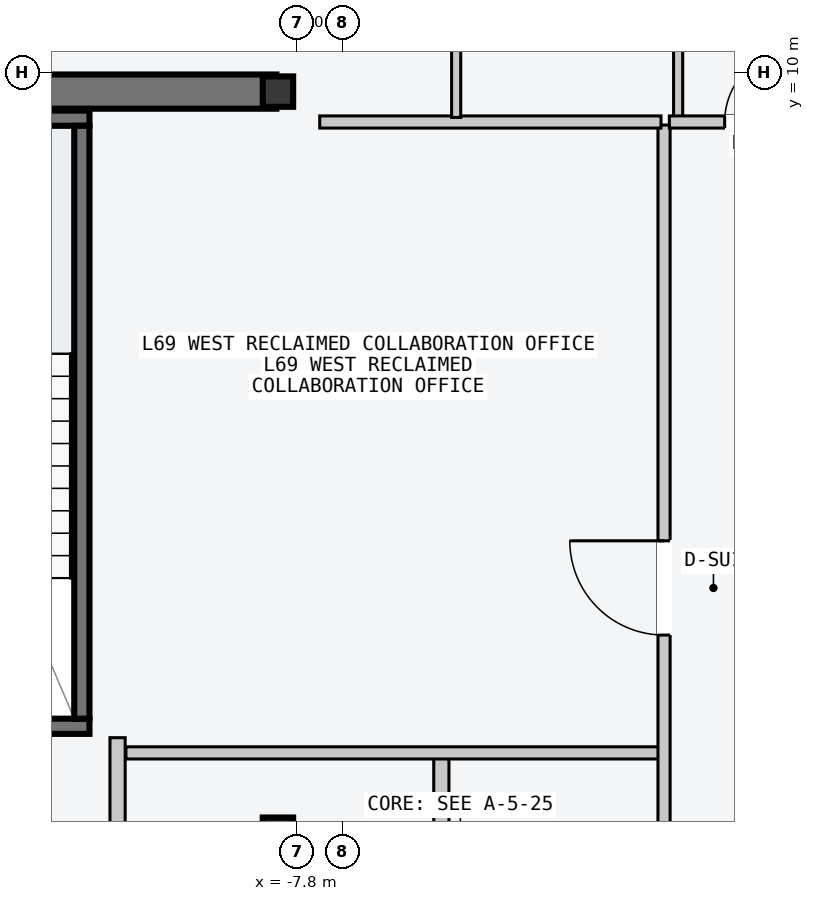
"""IFC4 building model, lengths in metres.
Left out: names, types, materials, properties, quantities, classifications, styles, units other than length and angle.
Written with IfcOpenShell. Run it as: python <this file> out.ifc"""

import sys

from ifc_helpers import new_model, si_unit, direction, frame, frame_2d, origin, origin_2d, place, context, subcontext, project, spatial, rectangle, i_section, extrude, element, fill, save


model = new_model("IFC4")
c1 = context("Model", 3, precision=1e-05, world=origin(), true_north=direction((0.0, 1.0)))
c2 = subcontext(c1, "Body", "Model", "MODEL_VIEW")
j1 = project(units=[si_unit("LENGTHUNIT", "METRE"), si_unit("PLANEANGLEUNIT", "RADIAN")], contexts=[c1])
p1 = place(None, origin())
s1 = spatial("IfcSite", under=j1, at=p1, CompositionType="ELEMENT")
p2 = place(p1, origin())
s2 = spatial("IfcBuilding", under=s1, at=p2, CompositionType="ELEMENT")
p3 = place(p2, frame((0.0, 0.0, 261.6)))
s3 = spatial("IfcBuildingStorey", under=s2, at=p3, CompositionType="ELEMENT", Elevation=261.6)
p4 = place(p3, frame((-14.53, 9.75, -0.2), z_axis=(0.0, 0.0, 1.0), x_axis=(1.0, 0.0, 0.0)))
e1 = element("IfcWall", 1, at=p4, inside=s3, PredefinedType="SHEAR", context=c2, shape_type="SweptSolid", body=[
    extrude(rectangle(XDim=6.46, YDim=0.45, at=frame_2d((3.23, 0.0))), origin(), (0.0, 0.0, 1.0), 3.6),
])
p5 = place(p3, frame((-14.25, 1.4, -0.2), z_axis=(0.0, 0.0, 1.0), x_axis=(1.0, 0.0, 0.0)))
e2 = element("IfcWall", 2, at=p5, inside=s3, PredefinedType="SOLIDWALL", context=c2, shape_type="SweptSolid", body=[
    extrude(rectangle(XDim=3.72, YDim=0.2, at=frame_2d((1.86, 0.0))), origin(), (0.0, 0.0, 1.0), 3.6),
])
p6 = place(p5, frame((1.5, 0.0, 0.2)))
e3 = element("IfcOpeningElement", 3, at=p6, cuts=e2, PredefinedType="OPENING", context=c2, shape_type="SweptSolid", body=[
    extrude(rectangle(XDim=1.12, YDim=2.18, at=frame_2d((0.56, 1.09))), frame((0.0, 0.11, 0.0), z_axis=(0.0, -1.0, 0.0), x_axis=(1.0, 0.0, 0.0)), (0.0, 0.0, 1.0), 0.22),
])
p7 = place(p3, frame((-14.25, 9.4, -0.2), z_axis=(0.0, 0.0, 1.0), x_axis=(1.0, 0.0, 0.0)))
e4 = element("IfcWall", 4, at=p7, inside=s3, PredefinedType="SOLIDWALL", context=c2, shape_type="SweptSolid", body=[
    extrude(rectangle(XDim=3.72, YDim=0.2, at=frame_2d((1.86, 0.0))), origin(), (0.0, 0.0, 1.0), 3.6),
])
p8 = place(p3, frame((-10.63, 1.5, -0.2), z_axis=(0.0, 0.0, 1.0), x_axis=(0.0, 1.0, 0.0)))
e5 = element("IfcWall", 5, at=p8, inside=s3, PredefinedType="SOLIDWALL", context=c2, shape_type="SweptSolid", body=[
    extrude(rectangle(XDim=7.8, YDim=0.2, at=frame_2d((3.9, 0.0))), origin(), (0.0, 0.0, 1.0), 3.6),
])
for number, where, z_axis, x_axis in (
    (6, (-8.05, 0.0, 0.0), (0.0, 0.0, 1.0), (1.0, 0.0, 0.0)),
    (7, (-8.05, 9.75, 0.0), (0.0, 0.0, 1.0), (1.0, 0.0, 0.0)),
):
    element("IfcColumn", number, at=place(p3, frame(where, z_axis=z_axis, x_axis=x_axis)), inside=s3, PredefinedType="COLUMN", context=c2, shape_type="SweptSolid", body=[
        extrude(i_section(OverallWidth=0.4, OverallDepth=0.4, WebThickness=0.013, FlangeThickness=0.021, at=origin_2d()), origin(), (0.0, 0.0, 1.0), 3.6),
    ])
p9 = place(p3, frame((-5.9, -9.45, 0.0), z_axis=(0.0, 0.0, 1.0), x_axis=(0.0, 1.0, 0.0)))
e8 = element("IfcWall", 8, at=p9, inside=s3, PredefinedType="PARTITIONING", context=c2, shape_type="SweptSolid", body=[
    extrude(rectangle(XDim=10.5, YDim=0.2, at=frame_2d((5.25, 0.0))), origin(), (0.0, 0.0, 1.0), 3.4),
])
p10 = place(p9, frame((3.9, 0.0, 0.0)))
e9 = element("IfcOpeningElement", 9, at=p10, cuts=e8, PredefinedType="OPENING", context=c2, shape_type="SweptSolid", body=[
    extrude(rectangle(XDim=1.5, YDim=2.2, at=frame_2d((0.75, 1.1))), frame((0.0, 0.11, 0.0), z_axis=(0.0, -1.0, 0.0), x_axis=(1.0, 0.0, 0.0)), (0.0, 0.0, 1.0), 0.22),
])
p11 = place(p3, frame((-10.16, -2.55, 0.0), z_axis=(0.0, 0.0, 1.0), x_axis=(0.0, 1.0, 0.0)))
e10 = element("IfcWall", 10, at=p11, inside=s3, PredefinedType="PARTITIONING", context=c2, shape_type="SweptSolid", body=[
    extrude(rectangle(XDim=3.8, YDim=0.2, at=frame_2d((1.9, 0.0))), origin(), (0.0, 0.0, 1.0), 3.4),
])
p12 = place(p11, frame((1.3, 0.0, 0.0)))
e11 = element("IfcOpeningElement", 11, at=p12, cuts=e10, PredefinedType="OPENING", context=c2, shape_type="SweptSolid", body=[
    extrude(rectangle(XDim=1.1, YDim=2.15, at=frame_2d((0.55, 1.075))), frame((0.0, 0.11, 0.0), z_axis=(0.0, -1.0, 0.0), x_axis=(1.0, 0.0, 0.0)), (0.0, 0.0, 1.0), 0.22),
])
p13 = place(p3, frame((-10.05, 1.05, 0.0), z_axis=(0.0, 0.0, 1.0), x_axis=(1.0, 0.0, 0.0)))
e12 = element("IfcWall", 12, at=p13, inside=s3, PredefinedType="PARTITIONING", context=c2, shape_type="SweptSolid", body=[
    extrude(rectangle(XDim=7.04, YDim=0.16, at=frame_2d((3.52, 0.0))), origin(), (0.0, 0.0, 1.0), 3.4),
])
p14 = place(p3, frame((-2.97, -3.5, 0.0), z_axis=(0.0, 0.0, 1.0), x_axis=(0.0, 1.0, 0.0)))
e13 = element("IfcWall", 13, at=p14, inside=s3, PredefinedType="PARTITIONING", context=c2, shape_type="SweptSolid", body=[
    extrude(rectangle(XDim=12.81, YDim=0.16, at=frame_2d((6.405, 0.0))), origin(), (0.0, 0.0, 1.0), 3.4),
])
p15 = place(p14, frame((6.1, 0.0, 0.0)))
e14 = element("IfcOpeningElement", 14, at=p15, cuts=e13, PredefinedType="OPENING", context=c2, shape_type="SweptSolid", body=[
    extrude(rectangle(XDim=1.24, YDim=2.24, at=frame_2d((0.62, 1.12))), frame((0.0, 0.09, 0.0), z_axis=(0.0, -1.0, 0.0), x_axis=(1.0, 0.0, 0.0)), (0.0, 0.0, 1.0), 0.18),
])
p16 = place(p14, frame((1.6, 0.0, 0.0)))
e15 = element("IfcOpeningElement", 15, at=p16, cuts=e13, PredefinedType="OPENING", context=c2, shape_type="SweptSolid", body=[
    extrude(rectangle(XDim=0.96, YDim=2.18, at=frame_2d((0.48, 1.09))), frame((0.0, 0.09, 0.0), z_axis=(0.0, -1.0, 0.0), x_axis=(1.0, 0.0, 0.0)), (0.0, 0.0, 1.0), 0.18),
])
p17 = place(p3, frame((-7.5, 9.35, 0.0), z_axis=(0.0, 0.0, 1.0), x_axis=(1.0, 0.0, 0.0)))
e16 = element("IfcWall", 16, at=p17, inside=s3, PredefinedType="PARTITIONING", context=c2, shape_type="SweptSolid", body=[
    extrude(rectangle(XDim=4.49, YDim=0.16, at=frame_2d((2.245, 0.0))), origin(), (0.0, 0.0, 1.0), 3.4),
])
p18 = place(p3, frame((-5.705, 9.41, 0.0), z_axis=(0.0, 0.0, 1.0), x_axis=(0.0, 1.0, 0.0)))
e17 = element("IfcWall", 17, at=p18, inside=s3, PredefinedType="PARTITIONING", context=c2, shape_type="SweptSolid", body=[
    extrude(rectangle(XDim=8.15, YDim=0.12, at=frame_2d((4.075, 0.0))), origin(), (0.0, 0.0, 1.0), 3.4),
])
p19 = place(p18, frame((1.15, 0.0, 0.0)))
e18 = element("IfcOpeningElement", 18, at=p19, cuts=e17, PredefinedType="OPENING", context=c2, shape_type="SweptSolid", body=[
    extrude(rectangle(XDim=0.96, YDim=2.18, at=frame_2d((0.48, 1.09))), frame((0.0, 0.07, 0.0), z_axis=(0.0, -1.0, 0.0), x_axis=(1.0, 0.0, 0.0)), (0.0, 0.0, 1.0), 0.14),
])
p20 = place(p3, frame((-2.785, 9.41, 0.0), z_axis=(0.0, 0.0, 1.0), x_axis=(0.0, 1.0, 0.0)))
e19 = element("IfcWall", 19, at=p20, inside=s3, PredefinedType="PARTITIONING", context=c2, shape_type="SweptSolid", body=[
    extrude(rectangle(XDim=8.15, YDim=0.12, at=frame_2d((4.075, 0.0))), origin(), (0.0, 0.0, 1.0), 3.4),
])
p21 = place(p20, frame((1.15, 0.0, 0.0)))
e20 = element("IfcOpeningElement", 20, at=p21, cuts=e19, PredefinedType="OPENING", context=c2, shape_type="SweptSolid", body=[
    extrude(rectangle(XDim=0.96, YDim=2.18, at=frame_2d((0.48, 1.09))), frame((0.0, 0.07, 0.0), z_axis=(0.0, -1.0, 0.0), x_axis=(1.0, 0.0, 0.0)), (0.0, 0.0, 1.0), 0.14),
])
p22 = place(p3, frame((-2.9, 9.35, 0.0), z_axis=(0.0, 0.0, 1.0), x_axis=(1.0, 0.0, 0.0)))
e21 = element("IfcWall", 21, at=p22, inside=s3, PredefinedType="PARTITIONING", context=c2, shape_type="SweptSolid", body=[
    extrude(rectangle(XDim=2.3, YDim=0.16, at=frame_2d((1.15, 0.0))), origin(), (0.0, 0.0, 1.0), 3.4),
])
p23 = place(p22, frame((0.728, 0.0, 0.0)))
e22 = element("IfcOpeningElement", 22, at=p23, cuts=e21, PredefinedType="OPENING", context=c2, shape_type="SweptSolid", body=[
    extrude(rectangle(XDim=0.96, YDim=2.18, at=frame_2d((0.48, 1.09))), frame((0.0, 0.09, 0.0), z_axis=(0.0, -1.0, 0.0), x_axis=(1.0, 0.0, 0.0)), (0.0, 0.0, 1.0), 0.18),
])
p24 = place(p15, origin())
e23 = element("IfcDoor", 23, at=p24, inside=s3, OperationType="SINGLE_SWING_RIGHT", PredefinedType="DOOR", context=c2, shape_type="SweptSolid", body=[
    extrude(rectangle(XDim=1.24, YDim=2.24, at=frame_2d((0.62, 1.12))), frame((0.0, 0.025, 0.0), z_axis=(0.0, -1.0, 0.0), x_axis=(1.0, 0.0, 0.0)), (0.0, 0.0, 1.0), 0.05),
])
fill(e14, e23)
p25 = place(p23, origin())
e24 = element("IfcDoor", 24, at=p25, inside=s3, OperationType="SINGLE_SWING_RIGHT", PredefinedType="DOOR", context=c2, shape_type="SweptSolid", body=[
    extrude(rectangle(XDim=0.96, YDim=2.18, at=frame_2d((0.48, 1.09))), frame((0.0, 0.025, 0.0), z_axis=(0.0, -1.0, 0.0), x_axis=(1.0, 0.0, 0.0)), (0.0, 0.0, 1.0), 0.05),
])
fill(e22, e24)
save(model, sys.argv[1])
